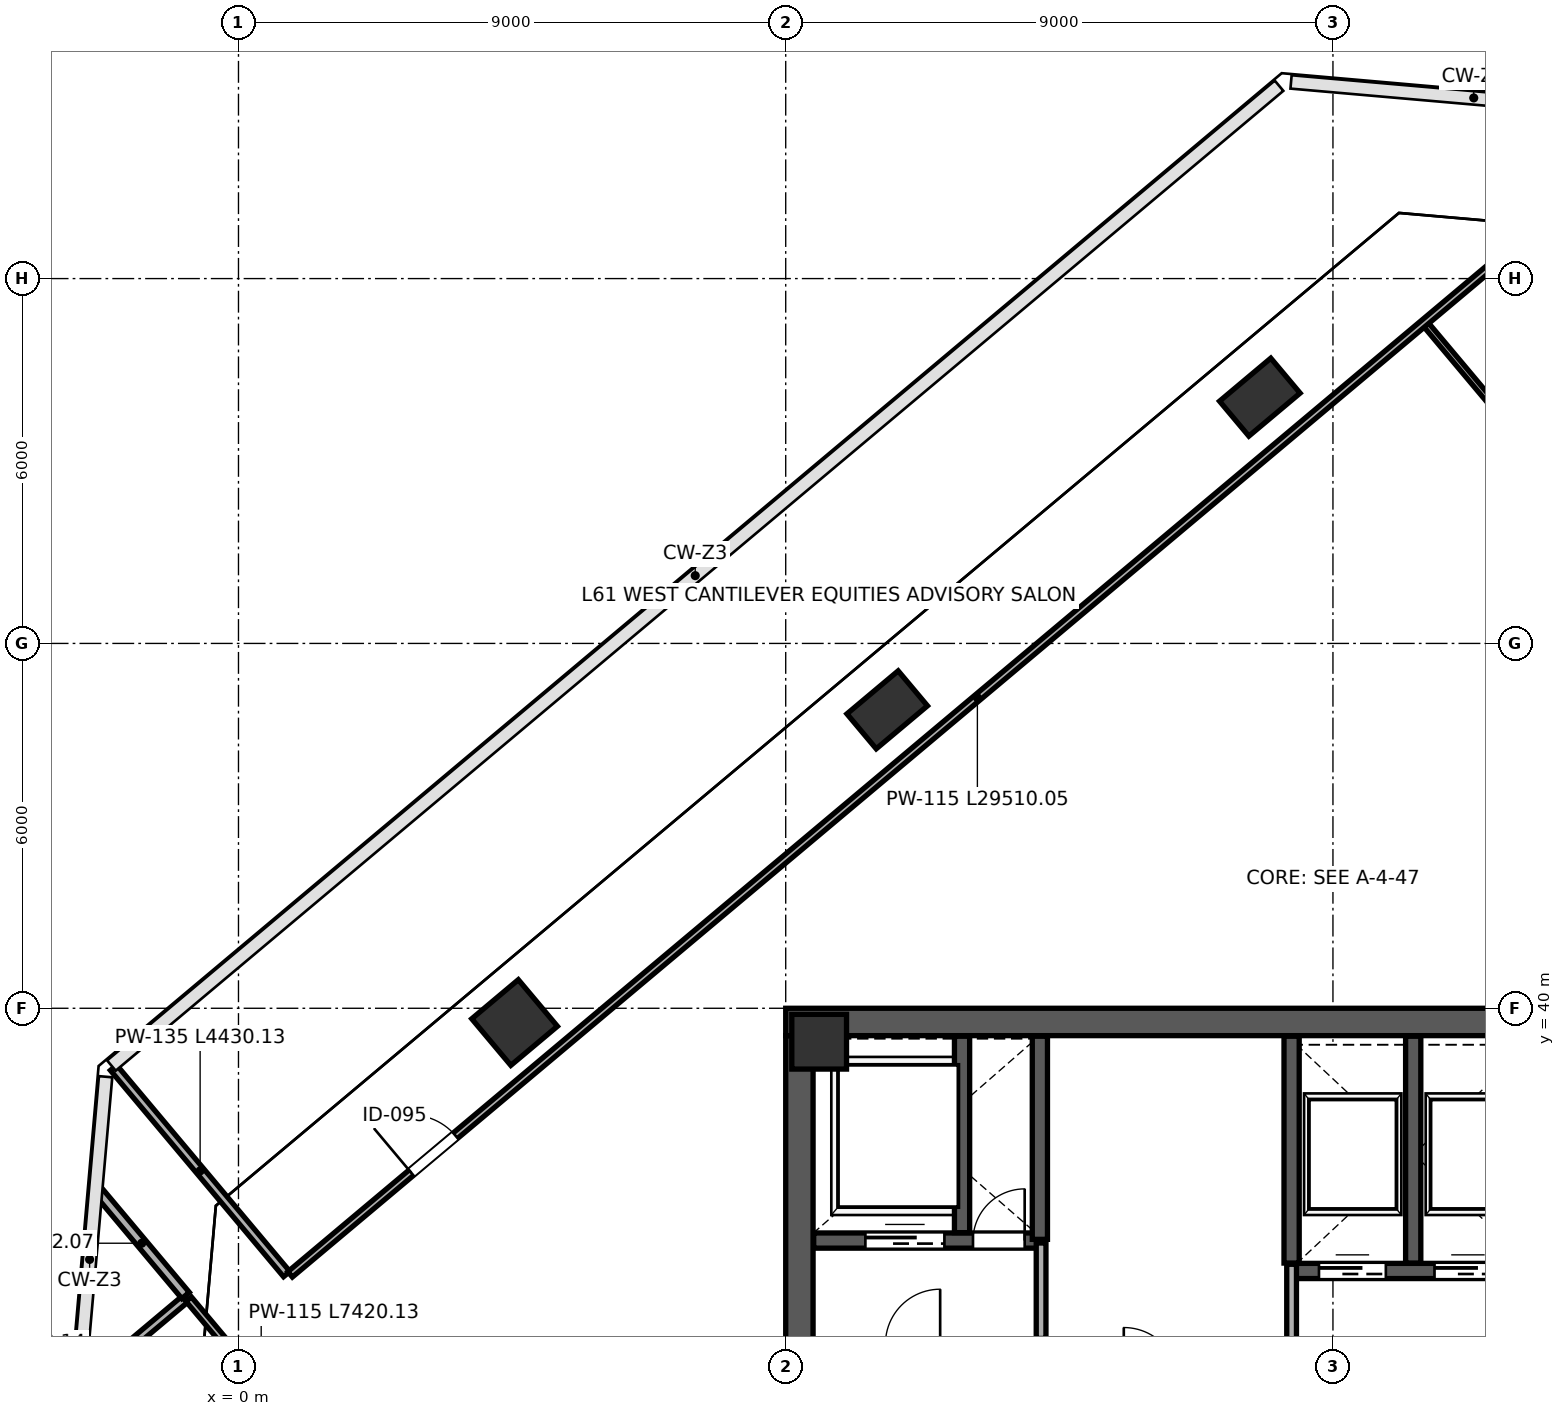
"""IFC4 building model, lengths in metres.
Left out: names, types, materials, properties, quantities, classifications, styles, units other than length and angle.
Written with IfcOpenShell. Run it as: python <this file> out.ifc"""

import sys

from ifc_helpers import new_model, si_unit, direction, frame, frame_2d, origin, origin_2d, place, context, subcontext, project, spatial, rectangle, extrude, source, transform, mapped, element, fill, save


model = new_model("IFC4")
c1 = context("Model", 3, precision=1e-05, world=origin(), true_north=direction((0.0, 1.0)))
c2 = subcontext(c1, "Body", "Model", "MODEL_VIEW")
j1 = project(units=[si_unit("LENGTHUNIT", "METRE"), si_unit("PLANEANGLEUNIT", "RADIAN")], contexts=[c1])
p1 = place(None, origin())
s1 = spatial("IfcSite", under=j1, at=p1, CompositionType="ELEMENT")
p2 = place(p1, origin())
s2 = spatial("IfcBuilding", under=s1, at=p2, CompositionType="ELEMENT")
p3 = place(p2, frame((0.0, 0.0, 271.0)))
s3 = spatial("IfcBuildingStorey", under=s2, at=p3, CompositionType="ELEMENT", Elevation=271.0)
m1 = source(origin(), c2, "Body", "SweptSolid", [
    extrude(rectangle(XDim=0.9, YDim=0.9, at=origin_2d()), origin(), (0.0, 0.0, 1.0), 4.198),
])
p4 = place(p3, frame((9.55, 39.45, 0.001), z_axis=(0.0, 0.0, 1.0), x_axis=(1.0, 0.0, 0.0)))
e1 = element("IfcColumn", 1, at=p4, inside=s3, PredefinedType="COLUMN", context=c2, shape_type="MappedRepresentation", body=[
    mapped(m1, transform((0.0, 0.0, 0.0), scale=1.0)),
])
m2 = source(origin(), c2, "Body", "SweptSolid", [
    extrude(rectangle(XDim=1.0, YDim=1.0, at=origin_2d()), origin(), (0.0, 0.0, 1.0), 4.198),
])
p5 = place(p3, frame((4.541, 39.765, 0.001), z_axis=(0.0, 0.0, 1.0), x_axis=(-0.642787609687, 0.766044443119, 0.0)))
e2 = element("IfcColumn", 2, at=p5, inside=s3, PredefinedType="COLUMN", context=c2, shape_type="MappedRepresentation", body=[
    mapped(m2, transform((0.0, 0.0, 0.0), scale=1.0)),
])
m3 = source(origin(), c2, "Body", "SweptSolid", [
    extrude(rectangle(XDim=0.75, YDim=1.1, at=origin_2d()), origin(), (0.0, 0.0, 1.0), 4.198),
])
for number, where, z_axis, x_axis in (
    (3, (10.669, 44.908, 0.001), (0.0, 0.0, 1.0), (-0.643, 0.766, 0.0)),
    (4, (16.797, 50.05, 0.001), (0.0, 0.0, 1.0), (-0.643, 0.766, 0.0)),
):
    element("IfcColumn", number, at=place(p3, frame(where, z_axis=z_axis, x_axis=x_axis)), inside=s3, PredefinedType="PILASTER", context=c2, shape_type="MappedRepresentation", body=[
        mapped(m3, transform((0.0, 0.0, 0.0), scale=1.0)),
    ])
p6 = place(p3, frame((9.225, 24.45, 0.0), z_axis=(0.0, 0.0, 1.0), x_axis=(0.0, 1.0, 0.0)))
e5 = element("IfcWall", 5, at=p6, inside=s3, PredefinedType="SHEAR", context=c2, shape_type="SweptSolid", body=[
    extrude(rectangle(XDim=15.1, YDim=0.45, at=frame_2d((7.55, 0.0))), origin(), (0.0, 0.0, 1.0), 3.96),
])
p7 = place(p6, frame((8.7, 0.0, 0.0)))
e6 = element("IfcOpeningElement", 6, at=p7, cuts=e5, PredefinedType="OPENING", context=c2, shape_type="SweptSolid", body=[
    extrude(rectangle(XDim=1.15, YDim=2.2, at=frame_2d((0.575, 1.1))), frame((0.0, 0.235, 0.0), z_axis=(0.0, -1.0, 0.0), x_axis=(1.0, 0.0, 0.0)), (0.0, 0.0, 1.0), 0.47),
])
p8 = place(p3, frame((9.0, 39.775, 0.0), z_axis=(0.0, 0.0, 1.0), x_axis=(1.0, 0.0, 0.0)))
e7 = element("IfcWall", 7, at=p8, inside=s3, PredefinedType="SHEAR", context=c2, shape_type="SweptSolid", body=[
    extrude(rectangle(XDim=18.0, YDim=0.45, at=frame_2d((9.0, 0.0))), origin(), (0.0, 0.0, 1.0), 3.96),
])
p9 = place(p3, frame((9.46, 36.18, 0.0), z_axis=(0.0, 0.0, 1.0), x_axis=(1.0, 0.0, 0.0)))
e8 = element("IfcWall", 8, at=p9, inside=s3, PredefinedType="SHEAR", context=c2, shape_type="SweptSolid", body=[
    extrude(rectangle(XDim=3.79, YDim=0.25, at=frame_2d((1.895, 0.0))), origin(), (0.0, 0.0, 1.0), 3.96),
])
p10 = place(p9, frame((2.62, 0.0, 0.0)))
e9 = element("IfcOpeningElement", 9, at=p10, cuts=e8, PredefinedType="OPENING", context=c2, shape_type="SweptSolid", body=[
    extrude(rectangle(XDim=0.85, YDim=2.1, at=frame_2d((0.425, 1.05))), frame((0.0, 0.135, 0.0), z_axis=(0.0, -1.0, 0.0), x_axis=(1.0, 0.0, 0.0)), (0.0, 0.0, 1.0), 0.27),
])
p11 = place(p9, frame((0.85, 0.0, 0.0)))
e10 = element("IfcOpeningElement", 10, at=p11, cuts=e8, PredefinedType="OPENING", context=c2, shape_type="SweptSolid", body=[
    extrude(rectangle(XDim=1.3, YDim=2.25, at=frame_2d((0.65, 1.125))), frame((0.0, 0.135, 0.0), z_axis=(0.0, -1.0, 0.0), x_axis=(1.0, 0.0, 0.0)), (0.0, 0.0, 1.0), 0.27),
])
p12 = place(p3, frame((11.9, 36.31, 0.0), z_axis=(0.0, 0.0, 1.0), x_axis=(0.0, 1.0, 0.0)))
e11 = element("IfcWall", 11, at=p12, inside=s3, PredefinedType="SHEAR", context=c2, shape_type="SweptSolid", body=[
    extrude(rectangle(XDim=3.23, YDim=0.25, at=frame_2d((1.615, 0.0))), origin(), (0.0, 0.0, 1.0), 3.96),
])
p13 = place(p3, frame((13.18, 36.2, 0.0), z_axis=(0.0, 0.0, 1.0), x_axis=(0.0, 1.0, 0.0)))
e12 = element("IfcWall", 12, at=p13, inside=s3, PredefinedType="SHEAR", context=c2, shape_type="SweptSolid", body=[
    extrude(rectangle(XDim=3.34, YDim=0.25, at=frame_2d((1.67, 0.0))), origin(), (0.0, 0.0, 1.0), 3.96),
])
p14 = place(p3, frame((17.32, 35.68, 0.0), z_axis=(0.0, 0.0, 1.0), x_axis=(1.0, 0.0, 0.0)))
e13 = element("IfcWall", 13, at=p14, inside=s3, PredefinedType="SHEAR", context=c2, shape_type="SweptSolid", body=[
    extrude(rectangle(XDim=3.87, YDim=0.25, at=frame_2d((1.935, 0.0))), origin(), (0.0, 0.0, 1.0), 3.96),
])
p15 = place(p14, frame((0.45, 0.0, 0.0)))
e14 = element("IfcOpeningElement", 14, at=p15, cuts=e13, PredefinedType="OPENING", context=c2, shape_type="SweptSolid", body=[
    extrude(rectangle(XDim=1.1, YDim=2.2, at=frame_2d((0.55, 1.1))), frame((0.0, 0.135, 0.0), z_axis=(0.0, -1.0, 0.0), x_axis=(1.0, 0.0, 0.0)), (0.0, 0.0, 1.0), 0.27),
])
p16 = place(p14, frame((2.35, 0.0, 0.0)))
e15 = element("IfcOpeningElement", 15, at=p16, cuts=e13, PredefinedType="OPENING", context=c2, shape_type="SweptSolid", body=[
    extrude(rectangle(XDim=1.1, YDim=2.2, at=frame_2d((0.55, 1.1))), frame((0.0, 0.135, 0.0), z_axis=(0.0, -1.0, 0.0), x_axis=(1.0, 0.0, 0.0)), (0.0, 0.0, 1.0), 0.27),
])
for number, where, z_axis, x_axis in (
    (16, (17.32, 35.81, 0.0), (0.0, 0.0, 1.0), (0.0, 1.0, 0.0)),
    (17, (19.32, 35.81, 0.0), (0.0, 0.0, 1.0), (0.0, 1.0, 0.0)),
):
    element("IfcWall", number, at=place(p3, frame(where, z_axis=z_axis, x_axis=x_axis)), inside=s3, PredefinedType="SHEAR", context=c2, shape_type="SweptSolid", body=[
        extrude(rectangle(XDim=3.73, YDim=0.25, at=frame_2d((1.865, 0.0))), origin(), (0.0, 0.0, 1.0), 3.96),
    ])
p17 = place(p3, frame((13.2, 34.57, 0.0), z_axis=(0.0, 0.0, 1.0), x_axis=(0.0, 1.0, 0.0)))
e18 = element("IfcWall", 18, at=p17, inside=s3, PredefinedType="PARTITIONING", context=c2, shape_type="SweptSolid", body=[
    extrude(rectangle(XDim=1.57, YDim=0.16, at=frame_2d((0.785, 0.0))), origin(), (0.0, 0.0, 1.0), 3.96),
])
p18 = place(p3, frame((17.32, 33.86, 0.0), z_axis=(0.0, 0.0, 1.0), x_axis=(0.0, 1.0, 0.0)))
e19 = element("IfcWall", 19, at=p18, inside=s3, PredefinedType="PARTITIONING", context=c2, shape_type="SweptSolid", body=[
    extrude(rectangle(XDim=1.93, YDim=0.16, at=frame_2d((0.965, 0.0))), origin(), (0.0, 0.0, 1.0), 3.96),
])
p19 = place(p3, frame((-2.593, 33.78, 0.0), z_axis=(0.0, 0.0, 1.0), x_axis=(0.765994359698, 0.642847292062, 0.0)))
e20 = element("IfcWall", 20, at=p19, inside=s3, PredefinedType="PARTITIONING", context=c2, shape_type="SweptSolid", body=[
    extrude(rectangle(XDim=2.242, YDim=0.135, at=frame_2d((1.121, 0.0))), origin(), (0.0, 0.0, 1.0), 3.96),
])
p20 = place(p3, frame((-2.312, 36.995, 0.0), z_axis=(0.0, 0.0, 1.0), x_axis=(0.642783398336, -0.766047976842, 0.0)))
e21 = element("IfcWall", 21, at=p20, inside=s3, PredefinedType="PARTITIONING", context=c2, shape_type="SweptSolid", body=[
    extrude(rectangle(XDim=2.242, YDim=0.16, at=frame_2d((1.121, 0.0))), origin(), (0.0, 0.0, 1.0), 3.96),
])
p21 = place(p3, frame((-0.819, 35.216, 0.0), z_axis=(0.0, 0.0, 1.0), x_axis=(0.642772999209, -0.766056702528, 0.0)))
e22 = element("IfcWall", 22, at=p21, inside=s3, PredefinedType="PARTITIONING", context=c2, shape_type="SweptSolid", body=[
    extrude(rectangle(XDim=7.42, YDim=0.115, at=frame_2d((3.71, 0.0))), origin(), (0.0, 0.0, 1.0), 3.96),
])
p22 = place(p21, frame((2.9, 0.0, 0.0)))
e23 = element("IfcOpeningElement", 23, at=p22, cuts=e22, PredefinedType="OPENING", context=c2, shape_type="SweptSolid", body=[
    extrude(rectangle(XDim=0.9, YDim=2.15, at=frame_2d((0.45, 1.075))), frame((0.0, 0.067, 0.0), z_axis=(0.0, -1.0, 0.0), x_axis=(1.0, 0.0, 0.0)), (0.0, 0.0, 1.0), 0.135),
])
p23 = place(p21, frame((5.0, 0.0, 0.0)))
e24 = element("IfcOpeningElement", 24, at=p23, cuts=e22, PredefinedType="OPENING", context=c2, shape_type="SweptSolid", body=[
    extrude(rectangle(XDim=0.95, YDim=2.15, at=frame_2d((0.475, 1.075))), frame((0.0, 0.067, 0.0), z_axis=(0.0, -1.0, 0.0), x_axis=(1.0, 0.0, 0.0)), (0.0, 0.0, 1.0), 0.135),
])
p24 = place(p3, frame((19.528, 51.245, 0.0), z_axis=(0.0, 0.0, 1.0), x_axis=(0.642782364439, -0.766048844374, 0.0)))
e25 = element("IfcWall", 25, at=p24, inside=s3, PredefinedType="PARTITIONING", context=c2, shape_type="SweptSolid", body=[
    extrude(rectangle(XDim=27.34, YDim=0.1, at=frame_2d((13.67, 0.0))), origin(), (0.0, 0.0, 1.0), 3.96),
])
p25 = place(p24, frame((10.8, 0.0, 0.0)))
e26 = element("IfcOpeningElement", 26, at=p25, cuts=e25, PredefinedType="OPENING", context=c2, shape_type="SweptSolid", body=[
    extrude(rectangle(XDim=0.95, YDim=2.15, at=frame_2d((0.475, 1.075))), frame((0.0, 0.06, 0.0), z_axis=(0.0, -1.0, 0.0), x_axis=(1.0, 0.0, 0.0)), (0.0, 0.0, 1.0), 0.12),
])
p26 = place(p3, frame((-2.055, 39.022, 0.0), z_axis=(0.0, 0.0, 1.0), x_axis=(0.642777132802, -0.766053234147, 0.0)))
e27 = element("IfcWall", 27, at=p26, inside=s3, PredefinedType="PARTITIONING", context=c2, shape_type="SweptSolid", body=[
    extrude(rectangle(XDim=4.43, YDim=0.135, at=frame_2d((2.215, 0.0))), origin(), (0.0, 0.0, 1.0), 3.96),
])
p27 = place(p3, frame((0.849, 35.624, 0.0), z_axis=(0.0, 0.0, 1.0), x_axis=(0.766042777978, 0.642789594119, 0.0)))
e28 = element("IfcWall", 28, at=p27, inside=s3, PredefinedType="PARTITIONING", context=c2, shape_type="SweptSolid", body=[
    extrude(rectangle(XDim=29.51, YDim=0.115, at=frame_2d((14.755, 0.0))), origin(), (0.0, 0.0, 1.0), 3.96),
])
p28 = place(p27, frame((2.6, 0.0, 0.0)))
e29 = element("IfcOpeningElement", 29, at=p28, cuts=e28, PredefinedType="OPENING", context=c2, shape_type="SweptSolid", body=[
    extrude(rectangle(XDim=0.95, YDim=2.15, at=frame_2d((0.475, 1.075))), frame((0.0, 0.067, 0.0), z_axis=(0.0, -1.0, 0.0), x_axis=(1.0, 0.0, 0.0)), (0.0, 0.0, 1.0), 0.135),
])
m4 = source(origin(), c2, "Body", "SweptSolid", [
    extrude(rectangle(XDim=0.85, YDim=2.1, at=frame_2d((0.425, 1.05))), frame((0.0, 0.025, 0.0), z_axis=(0.0, -1.0, 0.0), x_axis=(1.0, 0.0, 0.0)), (0.0, 0.0, 1.0), 0.05),
])
p29 = place(p10, origin())
e30 = element("IfcDoor", 30, at=p29, inside=s3, OperationType="SINGLE_SWING_RIGHT", PredefinedType="DOOR", context=c2, shape_type="MappedRepresentation", body=[
    mapped(m4, transform((0.0, 0.0, 0.0), scale=1.0)),
])
fill(e9, e30)
m5 = source(origin(), c2, "Body", "SweptSolid", [
    extrude(rectangle(XDim=1.1, YDim=2.2, at=frame_2d((0.55, 1.1))), frame((0.0, 0.025, 0.0), z_axis=(0.0, -1.0, 0.0), x_axis=(1.0, 0.0, 0.0)), (0.0, 0.0, 1.0), 0.05),
])
p30 = place(p15, origin())
e31 = element("IfcDoor", 31, at=p30, inside=s3, OperationType="SLIDING_TO_LEFT", PredefinedType="DOOR", context=c2, shape_type="MappedRepresentation", body=[
    mapped(m5, transform((0.0, 0.0, 0.0), scale=1.0)),
])
fill(e14, e31)
p31 = place(p16, origin())
e32 = element("IfcDoor", 32, at=p31, inside=s3, OperationType="SLIDING_TO_RIGHT", PredefinedType="DOOR", context=c2, shape_type="MappedRepresentation", body=[
    mapped(m5, transform((0.0, 0.0, 0.0), scale=1.0)),
])
fill(e15, e32)
m6 = source(origin(), c2, "Body", "SweptSolid", [
    extrude(rectangle(XDim=1.3, YDim=2.25, at=frame_2d((0.65, 1.125))), frame((0.0, 0.025, 0.0), z_axis=(0.0, -1.0, 0.0), x_axis=(1.0, 0.0, 0.0)), (0.0, 0.0, 1.0), 0.05),
])
p32 = place(p11, origin())
e33 = element("IfcDoor", 33, at=p32, inside=s3, OperationType="SLIDING_TO_LEFT", PredefinedType="DOOR", context=c2, shape_type="MappedRepresentation", body=[
    mapped(m6, transform((0.0, 0.0, 0.0), scale=1.0)),
])
fill(e10, e33)
m7 = source(origin(), c2, "Body", "SweptSolid", [
    extrude(rectangle(XDim=0.95, YDim=2.15, at=frame_2d((0.475, 1.075))), frame((0.0, 0.025, 0.0), z_axis=(0.0, -1.0, 0.0), x_axis=(1.0, 0.0, 0.0)), (0.0, 0.0, 1.0), 0.05),
])
p33 = place(p28, origin())
e34 = element("IfcDoor", 34, at=p33, inside=s3, OperationType="SINGLE_SWING_LEFT", PredefinedType="DOOR", context=c2, shape_type="MappedRepresentation", body=[
    mapped(m7, transform((0.0, 0.0, 0.0), scale=1.0)),
])
fill(e29, e34)
save(model, sys.argv[1])
